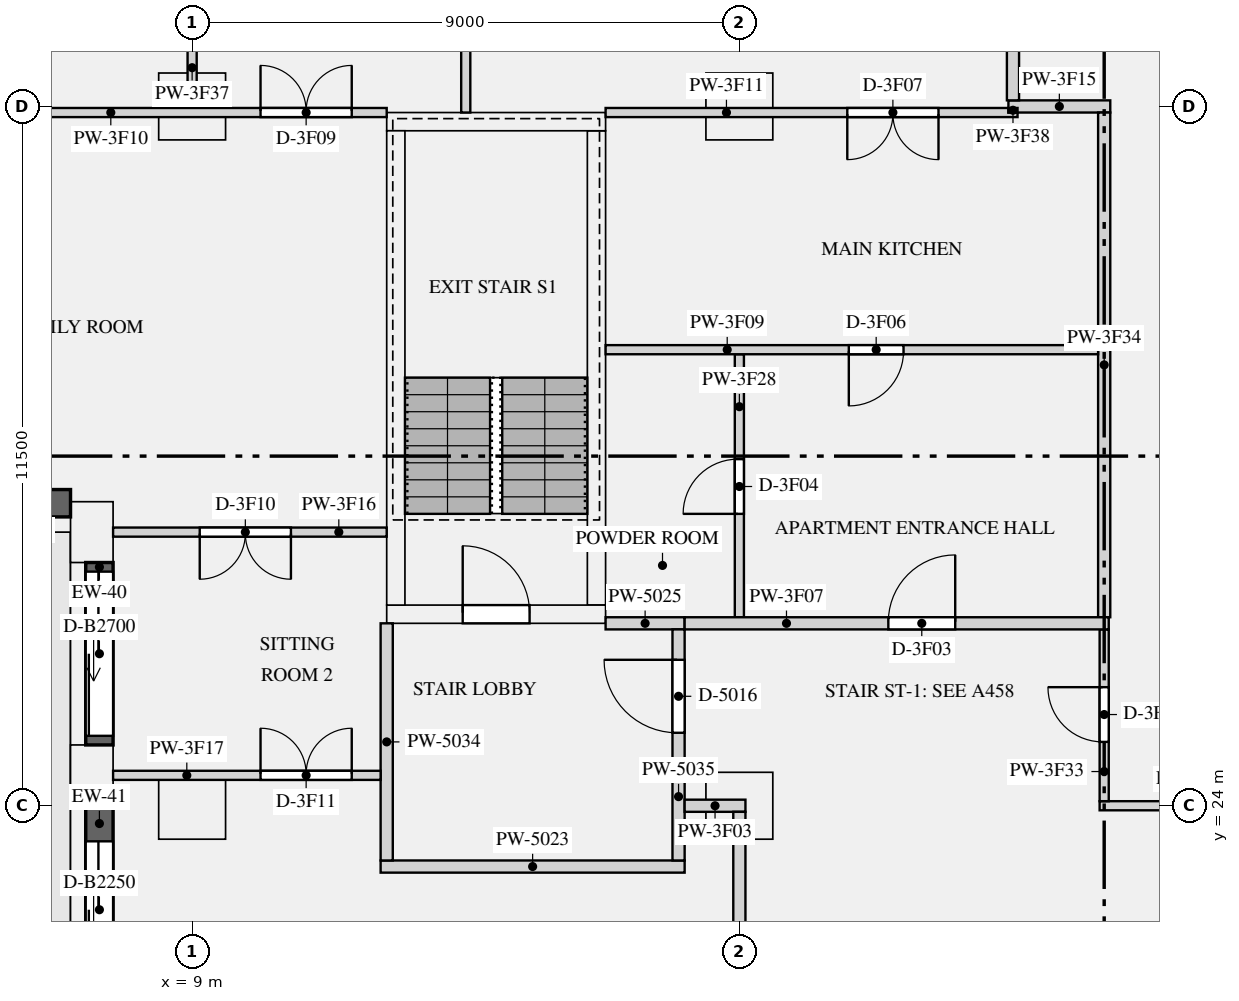
"""IFC4 building model, lengths in metres.
Left out: names, types, materials, properties, quantities, classifications, styles, units other than length and angle.
Written with IfcOpenShell. Run it as: python <this file> out.ifc"""

import sys

from ifc_helpers import new_model, si_unit, direction, frame, frame_2d, origin, origin_2d, place, context, subcontext, project, spatial, rectangle, extrude, element, fill, save


model = new_model("IFC4")
c1 = context("Model", 3, precision=1e-05, world=origin(), true_north=direction((0.0, 1.0)))
c2 = subcontext(c1, "Body", "Model", "MODEL_VIEW")
j1 = project(units=[si_unit("LENGTHUNIT", "METRE"), si_unit("PLANEANGLEUNIT", "RADIAN")], contexts=[c1])
p1 = place(None, origin())
s1 = spatial("IfcSite", under=j1, at=p1, CompositionType="ELEMENT")
p2 = place(p1, origin())
s2 = spatial("IfcBuilding", under=s1, at=p2, CompositionType="ELEMENT")
p3 = place(p2, frame((0.0, 0.0, 179.1)))
s3 = spatial("IfcBuildingStorey", under=s2, at=p3, CompositionType="ELEMENT", Elevation=179.1)
for number, where, z_axis, x_axis in (
    (1, (7.35, 28.5, 0.0), (0.0, 0.0, 1.0), (0.0, -1.0, 0.0)),
    (2, (7.35, 24.5, 0.0), (0.0, 0.0, 1.0), (0.0, -1.0, 0.0)),
):
    element("IfcColumn", number, at=place(p3, frame(where, z_axis=z_axis, x_axis=x_axis)), inside=s3, PredefinedType="USERDEFINED", context=c2, shape_type="SweptSolid", body=[
        extrude(rectangle(XDim=1.0, YDim=0.7, at=origin_2d()), origin(), (0.0, 0.0, 1.0), 3.15),
    ])
for number, where, z_axis, x_axis in (
    (3, (9.0, 24.0, 0.0), (0.0, 0.0, 1.0), (1.0, 0.0, 0.0)),
    (4, (18.0, 24.0, 0.0), (0.0, 0.0, 1.0), (1.0, 0.0, 0.0)),
    (5, (9.0, 35.5, 0.0), (0.0, 0.0, 1.0), (1.0, 0.0, 0.0)),
    (6, (18.0, 35.5, 0.0), (0.0, 0.0, 1.0), (1.0, 0.0, 0.0)),
):
    element("IfcColumn", number, at=place(p3, frame(where, z_axis=z_axis, x_axis=x_axis)), inside=s3, PredefinedType="COLUMN", context=c2, shape_type="SweptSolid", body=[
        extrude(rectangle(XDim=1.1, YDim=1.1, at=origin_2d()), origin(), (0.0, 0.0, 1.0), 3.15),
    ])
p4 = place(p3, frame((12.2, 27.15, 0.0), z_axis=(0.0, 0.0, 1.0), x_axis=(1.0, 0.0, 0.0)))
e7 = element("IfcWall", 7, at=p4, inside=s3, PredefinedType="SHEAR", context=c2, shape_type="SweptSolid", body=[
    extrude(rectangle(XDim=3.6, YDim=0.3, at=frame_2d((1.8, 0.0))), origin(), (0.0, 0.0, 1.0), 3.15),
])
p5 = place(p4, frame((1.25, 0.0, 0.0)))
e8 = element("IfcOpeningElement", 8, at=p5, cuts=e7, PredefinedType="OPENING", context=c2, shape_type="SweptSolid", body=[
    extrude(rectangle(XDim=1.1, YDim=2.1, at=frame_2d((0.55, 1.05))), frame((0.0, 0.16, 0.0), z_axis=(0.0, -1.0, 0.0), x_axis=(1.0, 0.0, 0.0)), (0.0, 0.0, 1.0), 0.32),
])
p6 = place(p3, frame((12.2, 35.25, 0.0), z_axis=(0.0, 0.0, 1.0), x_axis=(1.0, 0.0, 0.0)))
e9 = element("IfcWall", 9, at=p6, inside=s3, PredefinedType="SHEAR", context=c2, shape_type="SweptSolid", body=[
    extrude(rectangle(XDim=3.6, YDim=0.3, at=frame_2d((1.8, 0.0))), origin(), (0.0, 0.0, 1.0), 3.15),
])
for number, where, z_axis, x_axis in (
    (10, (12.35, 27.3, 0.0), (0.0, 0.0, 1.0), (0.0, 1.0, 0.0)),
    (11, (15.65, 27.3, 0.0), (0.0, 0.0, 1.0), (0.0, 1.0, 0.0)),
):
    element("IfcWall", number, at=place(p3, frame(where, z_axis=z_axis, x_axis=x_axis)), inside=s3, PredefinedType="SHEAR", context=c2, shape_type="SweptSolid", body=[
        extrude(rectangle(XDim=7.8, YDim=0.3, at=frame_2d((3.9, 0.0))), origin(), (0.0, 0.0, 1.0), 3.15),
    ])
p7 = place(p3, frame((5.5, 28.975, 0.9), z_axis=(0.0, 0.0, 1.0), x_axis=(1.0, 0.0, 0.0)))
e12 = element("IfcWall", 12, at=p7, inside=s3, PredefinedType="SOLIDWALL", context=c2, shape_type="SweptSolid", body=[
    extrude(rectangle(XDim=1.5, YDim=0.45, at=frame_2d((0.75, 0.0))), origin(), (0.0, 0.0, 1.0), 1.93),
])
p8 = place(p3, frame((7.475, 28.0, 0.0), z_axis=(0.0, 0.0, 1.0), x_axis=(0.0, -1.0, 0.0)))
e13 = element("IfcWall", 13, at=p8, inside=s3, PredefinedType="SOLIDWALL", context=c2, shape_type="SweptSolid", body=[
    extrude(rectangle(XDim=3.0, YDim=0.45, at=frame_2d((1.5, 0.0))), origin(), (0.0, 0.0, 1.0), 2.83),
])
p9 = place(p8, frame((0.15, 0.0, 0.0)))
e14 = element("IfcOpeningElement", 14, at=p9, cuts=e13, PredefinedType="OPENING", context=c2, shape_type="SweptSolid", body=[
    extrude(rectangle(XDim=2.7, YDim=2.3, at=frame_2d((1.35, 1.15))), frame((0.0, 0.235, 0.0), z_axis=(0.0, -1.0, 0.0), x_axis=(1.0, 0.0, 0.0)), (0.0, 0.0, 1.0), 0.47),
])
p10 = place(p3, frame((7.475, 24.0, 0.0), z_axis=(0.0, 0.0, 1.0), x_axis=(0.0, -1.0, 0.0)))
e15 = element("IfcWall", 15, at=p10, inside=s3, PredefinedType="SOLIDWALL", context=c2, shape_type="SweptSolid", body=[
    extrude(rectangle(XDim=3.0, YDim=0.45, at=frame_2d((1.5, 0.0))), origin(), (0.0, 0.0, 1.0), 2.83),
])
p11 = place(p10, frame((0.585, 0.0, 0.0)))
e16 = element("IfcOpeningElement", 16, at=p11, cuts=e15, PredefinedType="OPENING", context=c2, shape_type="SweptSolid", body=[
    extrude(rectangle(XDim=2.25, YDim=2.3, at=frame_2d((1.125, 1.15))), frame((0.0, 0.235, 0.0), z_axis=(0.0, -1.0, 0.0), x_axis=(1.0, 0.0, 0.0)), (0.0, 0.0, 1.0), 0.47),
])
p12 = place(p3, frame((12.1, 23.0, 0.0), z_axis=(0.0, 0.0, 1.0), x_axis=(1.0, 0.0, 0.0)))
e17 = element("IfcWall", 17, at=p12, inside=s3, PredefinedType="PARTITIONING", context=c2, shape_type="SweptSolid", body=[
    extrude(rectangle(XDim=5.0, YDim=0.2, at=frame_2d((2.5, 0.0))), origin(), (0.0, 0.0, 1.0), 2.83),
])
p13 = place(p3, frame((15.8, 27.0, 0.0), z_axis=(0.0, 0.0, 1.0), x_axis=(1.0, 0.0, 0.0)))
e18 = element("IfcWall", 18, at=p13, inside=s3, PredefinedType="PARTITIONING", context=c2, shape_type="SweptSolid", body=[
    extrude(rectangle(XDim=1.3, YDim=0.2, at=frame_2d((0.65, 0.0))), origin(), (0.0, 0.0, 1.0), 2.83),
])
p14 = place(p3, frame((12.2, 23.1, 0.0), z_axis=(0.0, 0.0, 1.0), x_axis=(0.0, 1.0, 0.0)))
e19 = element("IfcWall", 19, at=p14, inside=s3, PredefinedType="PARTITIONING", context=c2, shape_type="SweptSolid", body=[
    extrude(rectangle(XDim=3.9, YDim=0.2, at=frame_2d((1.95, 0.0))), origin(), (0.0, 0.0, 1.0), 2.83),
])
p15 = place(p3, frame((17.0, 23.1, 0.0), z_axis=(0.0, 0.0, 1.0), x_axis=(0.0, 1.0, 0.0)))
e20 = element("IfcWall", 20, at=p15, inside=s3, PredefinedType="PARTITIONING", context=c2, shape_type="SweptSolid", body=[
    extrude(rectangle(XDim=3.8, YDim=0.2, at=frame_2d((1.9, 0.0))), origin(), (0.0, 0.0, 1.0), 2.83),
])
p16 = place(p15, frame((2.1, 0.0, 0.0)))
e21 = element("IfcOpeningElement", 21, at=p16, cuts=e20, PredefinedType="OPENING", context=c2, shape_type="SweptSolid", body=[
    extrude(rectangle(XDim=1.2, YDim=2.1, at=frame_2d((0.6, 1.05))), frame((0.0, 0.11, 0.0), z_axis=(0.0, -1.0, 0.0), x_axis=(1.0, 0.0, 0.0)), (0.0, 0.0, 1.0), 0.22),
])
p17 = place(p3, frame((23.925, 24.0, 0.0), z_axis=(0.0, 0.0, 1.0), x_axis=(1.0, 0.0, 0.0)))
e22 = element("IfcWall", 22, at=p17, inside=s3, PredefinedType="PARTITIONING", context=c2, shape_type="SweptSolid", body=[
    extrude(rectangle(XDim=3.075, YDim=0.15, at=frame_2d((1.538, 0.0))), origin(), (0.0, 0.0, 1.0), 2.83),
])
p18 = place(p3, frame((17.1, 24.0, 0.0), z_axis=(0.0, 0.0, 1.0), x_axis=(1.0, 0.0, 0.0)))
e23 = element("IfcWall", 23, at=p18, inside=s3, PredefinedType="PARTITIONING", context=c2, shape_type="SweptSolid", body=[
    extrude(rectangle(XDim=1.0, YDim=0.2, at=frame_2d((0.5, 0.0))), origin(), (0.0, 0.0, 1.0), 2.83),
])
p19 = place(p3, frame((17.1, 27.0, 0.0), z_axis=(0.0, 0.0, 1.0), x_axis=(1.0, 0.0, 0.0)))
e24 = element("IfcWall", 24, at=p19, inside=s3, PredefinedType="PARTITIONING", context=c2, shape_type="SweptSolid", body=[
    extrude(rectangle(XDim=6.975, YDim=0.2, at=frame_2d((3.487, 0.0))), origin(), (0.0, 0.0, 1.0), 2.83),
])
p20 = place(p19, frame((3.35, 0.0, 0.0)))
e25 = element("IfcOpeningElement", 25, at=p20, cuts=e24, PredefinedType="OPENING", context=c2, shape_type="SweptSolid", body=[
    extrude(rectangle(XDim=1.1, YDim=2.1, at=frame_2d((0.55, 1.05))), frame((0.0, 0.11, 0.0), z_axis=(0.0, -1.0, 0.0), x_axis=(1.0, 0.0, 0.0)), (0.0, 0.0, 1.0), 0.22),
])
p21 = place(p3, frame((15.8, 31.5, 0.0), z_axis=(0.0, 0.0, 1.0), x_axis=(1.0, 0.0, 0.0)))
e26 = element("IfcWall", 26, at=p21, inside=s3, PredefinedType="PARTITIONING", context=c2, shape_type="SweptSolid", body=[
    extrude(rectangle(XDim=8.1, YDim=0.15, at=frame_2d((4.05, 0.0))), origin(), (0.0, 0.0, 1.0), 2.83),
])
p22 = place(p21, frame((4.0, 0.0, 0.0)))
e27 = element("IfcOpeningElement", 27, at=p22, cuts=e26, PredefinedType="OPENING", context=c2, shape_type="SweptSolid", body=[
    extrude(rectangle(XDim=0.9, YDim=2.1, at=frame_2d((0.45, 1.05))), frame((0.0, 0.085, 0.0), z_axis=(0.0, -1.0, 0.0), x_axis=(1.0, 0.0, 0.0)), (0.0, 0.0, 1.0), 0.17),
])
p23 = place(p3, frame((5.2, 35.4, 0.0), z_axis=(0.0, 0.0, 1.0), x_axis=(1.0, 0.0, 0.0)))
e28 = element("IfcWall", 28, at=p23, inside=s3, PredefinedType="PARTITIONING", context=c2, shape_type="SweptSolid", body=[
    extrude(rectangle(XDim=7.0, YDim=0.15, at=frame_2d((3.5, 0.0))), origin(), (0.0, 0.0, 1.0), 2.83),
])
p24 = place(p23, frame((4.925, 0.0, 0.0)))
e29 = element("IfcOpeningElement", 29, at=p24, cuts=e28, PredefinedType="OPENING", context=c2, shape_type="SweptSolid", body=[
    extrude(rectangle(XDim=1.5, YDim=2.1, at=frame_2d((0.75, 1.05))), frame((0.0, 0.085, 0.0), z_axis=(0.0, -1.0, 0.0), x_axis=(1.0, 0.0, 0.0)), (0.0, 0.0, 1.0), 0.17),
])
p25 = place(p3, frame((15.8, 35.4, 0.0), z_axis=(0.0, 0.0, 1.0), x_axis=(1.0, 0.0, 0.0)))
e30 = element("IfcWall", 30, at=p25, inside=s3, PredefinedType="PARTITIONING", context=c2, shape_type="SweptSolid", body=[
    extrude(rectangle(XDim=6.775, YDim=0.15, at=frame_2d((3.387, 0.0))), origin(), (0.0, 0.0, 1.0), 2.83),
])
p26 = place(p25, frame((3.975, 0.0, 0.0)))
e31 = element("IfcOpeningElement", 31, at=p26, cuts=e30, PredefinedType="OPENING", context=c2, shape_type="SweptSolid", body=[
    extrude(rectangle(XDim=1.5, YDim=2.1, at=frame_2d((0.75, 1.05))), frame((0.0, 0.085, 0.0), z_axis=(0.0, -1.0, 0.0), x_axis=(1.0, 0.0, 0.0)), (0.0, 0.0, 1.0), 0.17),
])
p27 = place(p3, frame((22.425, 35.5, 0.0), z_axis=(0.0, 0.0, 1.0), x_axis=(1.0, 0.0, 0.0)))
e32 = element("IfcWall", 32, at=p27, inside=s3, PredefinedType="PARTITIONING", context=c2, shape_type="SweptSolid", body=[
    extrude(rectangle(XDim=1.675, YDim=0.2, at=frame_2d((0.837, 0.0))), origin(), (0.0, 0.0, 1.0), 2.83),
])
p28 = place(p3, frame((7.7, 28.5, 0.0), z_axis=(0.0, 0.0, 1.0), x_axis=(1.0, 0.0, 0.0)))
e33 = element("IfcWall", 33, at=p28, inside=s3, PredefinedType="PARTITIONING", context=c2, shape_type="SweptSolid", body=[
    extrude(rectangle(XDim=4.5, YDim=0.15, at=frame_2d((2.25, 0.0))), origin(), (0.0, 0.0, 1.0), 2.83),
])
p29 = place(p28, frame((1.425, 0.0, 0.0)))
e34 = element("IfcOpeningElement", 34, at=p29, cuts=e33, PredefinedType="OPENING", context=c2, shape_type="SweptSolid", body=[
    extrude(rectangle(XDim=1.5, YDim=2.1, at=frame_2d((0.75, 1.05))), frame((0.0, 0.085, 0.0), z_axis=(0.0, -1.0, 0.0), x_axis=(1.0, 0.0, 0.0)), (0.0, 0.0, 1.0), 0.17),
])
p30 = place(p3, frame((7.7, 24.5, 0.0), z_axis=(0.0, 0.0, 1.0), x_axis=(1.0, 0.0, 0.0)))
e35 = element("IfcWall", 35, at=p30, inside=s3, PredefinedType="PARTITIONING", context=c2, shape_type="SweptSolid", body=[
    extrude(rectangle(XDim=4.4, YDim=0.15, at=frame_2d((2.2, 0.0))), origin(), (0.0, 0.0, 1.0), 2.83),
])
p31 = place(p30, frame((2.425, 0.0, 0.0)))
e36 = element("IfcOpeningElement", 36, at=p31, cuts=e35, PredefinedType="OPENING", context=c2, shape_type="SweptSolid", body=[
    extrude(rectangle(XDim=1.5, YDim=2.1, at=frame_2d((0.75, 1.05))), frame((0.0, 0.085, 0.0), z_axis=(0.0, -1.0, 0.0), x_axis=(1.0, 0.0, 0.0)), (0.0, 0.0, 1.0), 0.17),
])
p32 = place(p3, frame((18.0, 27.1, 0.0), z_axis=(0.0, 0.0, 1.0), x_axis=(0.0, 1.0, 0.0)))
e37 = element("IfcWall", 37, at=p32, inside=s3, PredefinedType="PARTITIONING", context=c2, shape_type="SweptSolid", body=[
    extrude(rectangle(XDim=4.325, YDim=0.15, at=frame_2d((2.163, 0.0))), origin(), (0.0, 0.0, 1.0), 2.83),
])
p33 = place(p32, frame((1.7, 0.0, 0.0)))
e38 = element("IfcOpeningElement", 38, at=p33, cuts=e37, PredefinedType="OPENING", context=c2, shape_type="SweptSolid", body=[
    extrude(rectangle(XDim=0.9, YDim=2.1, at=frame_2d((0.45, 1.05))), frame((0.0, 0.085, 0.0), z_axis=(0.0, -1.0, 0.0), x_axis=(1.0, 0.0, 0.0)), (0.0, 0.0, 1.0), 0.17),
])
p34 = place(p3, frame((18.0, 16.1, 0.0), z_axis=(0.0, 0.0, 1.0), x_axis=(0.0, 1.0, 0.0)))
e39 = element("IfcWall", 39, at=p34, inside=s3, PredefinedType="PARTITIONING", context=c2, shape_type="SweptSolid", body=[
    extrude(rectangle(XDim=7.8, YDim=0.2, at=frame_2d((3.9, 0.0))), origin(), (0.0, 0.0, 1.0), 2.83),
])
p35 = place(p3, frame((24.0, 24.075, 0.0), z_axis=(0.0, 0.0, 1.0), x_axis=(0.0, 1.0, 0.0)))
e40 = element("IfcWall", 40, at=p35, inside=s3, PredefinedType="PARTITIONING", context=c2, shape_type="SweptSolid", body=[
    extrude(rectangle(XDim=2.825, YDim=0.15, at=frame_2d((1.413, 0.0))), origin(), (0.0, 0.0, 1.0), 2.83),
])
p36 = place(p35, frame((0.975, 0.0, 0.0)))
e41 = element("IfcOpeningElement", 41, at=p36, cuts=e40, PredefinedType="OPENING", context=c2, shape_type="SweptSolid", body=[
    extrude(rectangle(XDim=0.9, YDim=2.1, at=frame_2d((0.45, 1.05))), frame((0.0, 0.085, 0.0), z_axis=(0.0, -1.0, 0.0), x_axis=(1.0, 0.0, 0.0)), (0.0, 0.0, 1.0), 0.17),
])
p37 = place(p3, frame((24.0, 27.1, 0.0), z_axis=(0.0, 0.0, 1.0), x_axis=(0.0, 1.0, 0.0)))
e42 = element("IfcWall", 42, at=p37, inside=s3, PredefinedType="PARTITIONING", context=c2, shape_type="SweptSolid", body=[
    extrude(rectangle(XDim=8.3, YDim=0.2, at=frame_2d((4.15, 0.0))), origin(), (0.0, 0.0, 1.0), 2.83),
])
p38 = place(p3, frame((9.0, 35.475, 0.0), z_axis=(0.0, 0.0, 1.0), x_axis=(0.0, 1.0, 0.0)))
e43 = element("IfcWall", 43, at=p38, inside=s3, PredefinedType="PARTITIONING", context=c2, shape_type="SweptSolid", body=[
    extrude(rectangle(XDim=2.825, YDim=0.15, at=frame_2d((1.413, 0.0))), origin(), (0.0, 0.0, 1.0), 2.83),
])
p39 = place(p38, frame((1.325, 0.0, 0.0)))
e44 = element("IfcOpeningElement", 44, at=p39, cuts=e43, PredefinedType="OPENING", context=c2, shape_type="SweptSolid", body=[
    extrude(rectangle(XDim=0.9, YDim=2.1, at=frame_2d((0.45, 1.05))), frame((0.0, 0.085, 0.0), z_axis=(0.0, -1.0, 0.0), x_axis=(1.0, 0.0, 0.0)), (0.0, 0.0, 1.0), 0.17),
])
p40 = place(p3, frame((22.5, 35.4, 0.0), z_axis=(0.0, 0.0, 1.0), x_axis=(0.0, 1.0, 0.0)))
e45 = element("IfcWall", 45, at=p40, inside=s3, PredefinedType="PARTITIONING", context=c2, shape_type="SweptSolid", body=[
    extrude(rectangle(XDim=0.075, YDim=0.15, at=frame_2d((0.038, 0.0))), origin(), (0.0, 0.0, 1.0), 2.83),
])
p41 = place(p3, frame((22.5, 35.6, 0.0), z_axis=(0.0, 0.0, 1.0), x_axis=(0.0, 1.0, 0.0)))
e46 = element("IfcWall", 46, at=p41, inside=s3, PredefinedType="PARTITIONING", context=c2, shape_type="SweptSolid", body=[
    extrude(rectangle(XDim=7.2, YDim=0.2, at=frame_2d((3.6, 0.0))), origin(), (0.0, 0.0, 1.0), 2.83),
])
p42 = place(p3, frame((13.5, 35.4, 0.0), z_axis=(0.0, 0.0, 1.0), x_axis=(0.0, 1.0, 0.0)))
e47 = element("IfcWall", 47, at=p42, inside=s3, PredefinedType="PARTITIONING", context=c2, shape_type="SweptSolid", body=[
    extrude(rectangle(XDim=7.4, YDim=0.15, at=frame_2d((3.7, 0.0))), origin(), (0.0, 0.0, 1.0), 2.83),
])
p43 = place(p42, frame((3.025, 0.0, 0.0)))
e48 = element("IfcOpeningElement", 48, at=p43, cuts=e47, PredefinedType="OPENING", context=c2, shape_type="SweptSolid", body=[
    extrude(rectangle(XDim=1.5, YDim=2.1, at=frame_2d((0.75, 1.05))), frame((0.0, 0.085, 0.0), z_axis=(0.0, -1.0, 0.0), x_axis=(1.0, 0.0, 0.0)), (0.0, 0.0, 1.0), 0.17),
])
p44 = place(p9, origin())
e49 = element("IfcDoor", 49, at=p44, inside=s3, OperationType="SLIDING_TO_LEFT", PredefinedType="DOOR", context=c2, shape_type="SweptSolid", body=[
    extrude(rectangle(XDim=2.7, YDim=2.3, at=frame_2d((1.35, 1.15))), frame((0.0, -0.07, 0.0), z_axis=(0.0, -1.0, 0.0), x_axis=(1.0, 0.0, 0.0)), (0.0, 0.0, 1.0), 0.05),
])
fill(e14, e49)
p45 = place(p11, origin())
e50 = element("IfcDoor", 50, at=p45, inside=s3, OperationType="SLIDING_TO_LEFT", PredefinedType="DOOR", context=c2, shape_type="SweptSolid", body=[
    extrude(rectangle(XDim=2.25, YDim=2.3, at=frame_2d((1.125, 1.15))), frame((0.0, -0.07, 0.0), z_axis=(0.0, -1.0, 0.0), x_axis=(1.0, 0.0, 0.0)), (0.0, 0.0, 1.0), 0.05),
])
fill(e16, e50)
p46 = place(p5, origin())
e51 = element("IfcDoor", 51, at=p46, inside=s3, OperationType="SINGLE_SWING_LEFT", PredefinedType="DOOR", context=c2, shape_type="SweptSolid", body=[
    extrude(rectangle(XDim=1.1, YDim=2.1, at=frame_2d((0.55, 1.05))), frame((0.0, 0.025, 0.0), z_axis=(0.0, -1.0, 0.0), x_axis=(1.0, 0.0, 0.0)), (0.0, 0.0, 1.0), 0.05),
])
fill(e8, e51)
p47 = place(p16, origin())
e52 = element("IfcDoor", 52, at=p47, inside=s3, OperationType="SINGLE_SWING_RIGHT", PredefinedType="DOOR", context=c2, shape_type="SweptSolid", body=[
    extrude(rectangle(XDim=1.2, YDim=2.1, at=frame_2d((0.6, 1.05))), frame((0.0, 0.025, 0.0), z_axis=(0.0, -1.0, 0.0), x_axis=(1.0, 0.0, 0.0)), (0.0, 0.0, 1.0), 0.05),
])
fill(e21, e52)
p48 = place(p20, origin())
e53 = element("IfcDoor", 53, at=p48, inside=s3, OperationType="SINGLE_SWING_RIGHT", PredefinedType="DOOR", context=c2, shape_type="SweptSolid", body=[
    extrude(rectangle(XDim=1.1, YDim=2.1, at=frame_2d((0.55, 1.05))), frame((0.0, 0.025, 0.0), z_axis=(0.0, -1.0, 0.0), x_axis=(1.0, 0.0, 0.0)), (0.0, 0.0, 1.0), 0.05),
])
fill(e25, e53)
p49 = place(p33, origin())
e54 = element("IfcDoor", 54, at=p49, inside=s3, OperationType="SINGLE_SWING_LEFT", PredefinedType="DOOR", context=c2, shape_type="SweptSolid", body=[
    extrude(rectangle(XDim=0.9, YDim=2.1, at=frame_2d((0.45, 1.05))), frame((0.0, 0.025, 0.0), z_axis=(0.0, -1.0, 0.0), x_axis=(1.0, 0.0, 0.0)), (0.0, 0.0, 1.0), 0.05),
])
fill(e38, e54)
p50 = place(p22, frame((0.9, 0.0, 0.0), z_axis=(0.0, 0.0, 1.0), x_axis=(-1.0, 0.0, 0.0)))
e55 = element("IfcDoor", 55, at=p50, inside=s3, OperationType="SINGLE_SWING_RIGHT", PredefinedType="DOOR", context=c2, shape_type="SweptSolid", body=[
    extrude(rectangle(XDim=0.9, YDim=2.1, at=frame_2d((0.45, 1.05))), frame((0.0, 0.025, 0.0), z_axis=(0.0, -1.0, 0.0), x_axis=(1.0, 0.0, 0.0)), (0.0, 0.0, 1.0), 0.05),
])
fill(e27, e55)
p51 = place(p26, frame((1.5, 0.0, 0.0), z_axis=(0.0, 0.0, 1.0), x_axis=(-1.0, 0.0, 0.0)))
e56 = element("IfcDoor", 56, at=p51, inside=s3, OperationType="DOUBLE_DOOR_SINGLE_SWING", PredefinedType="DOOR", context=c2, shape_type="SweptSolid", body=[
    extrude(rectangle(XDim=1.5, YDim=2.1, at=frame_2d((0.75, 1.05))), frame((0.0, 0.025, 0.0), z_axis=(0.0, -1.0, 0.0), x_axis=(1.0, 0.0, 0.0)), (0.0, 0.0, 1.0), 0.05),
])
fill(e31, e56)
p52 = place(p24, origin())
e57 = element("IfcDoor", 57, at=p52, inside=s3, OperationType="DOUBLE_DOOR_SINGLE_SWING", PredefinedType="DOOR", context=c2, shape_type="SweptSolid", body=[
    extrude(rectangle(XDim=1.5, YDim=2.1, at=frame_2d((0.75, 1.05))), frame((0.0, 0.025, 0.0), z_axis=(0.0, -1.0, 0.0), x_axis=(1.0, 0.0, 0.0)), (0.0, 0.0, 1.0), 0.05),
])
fill(e29, e57)
p53 = place(p29, frame((1.5, 0.0, 0.0), z_axis=(0.0, 0.0, 1.0), x_axis=(-1.0, 0.0, 0.0)))
e58 = element("IfcDoor", 58, at=p53, inside=s3, OperationType="DOUBLE_DOOR_SINGLE_SWING", PredefinedType="DOOR", context=c2, shape_type="SweptSolid", body=[
    extrude(rectangle(XDim=1.5, YDim=2.1, at=frame_2d((0.75, 1.05))), frame((0.0, 0.025, 0.0), z_axis=(0.0, -1.0, 0.0), x_axis=(1.0, 0.0, 0.0)), (0.0, 0.0, 1.0), 0.05),
])
fill(e34, e58)
p54 = place(p31, origin())
e59 = element("IfcDoor", 59, at=p54, inside=s3, OperationType="DOUBLE_DOOR_SINGLE_SWING", PredefinedType="DOOR", context=c2, shape_type="SweptSolid", body=[
    extrude(rectangle(XDim=1.5, YDim=2.1, at=frame_2d((0.75, 1.05))), frame((0.0, 0.025, 0.0), z_axis=(0.0, -1.0, 0.0), x_axis=(1.0, 0.0, 0.0)), (0.0, 0.0, 1.0), 0.05),
])
fill(e36, e59)
p55 = place(p36, origin())
e60 = element("IfcDoor", 60, at=p55, inside=s3, OperationType="SINGLE_SWING_RIGHT", PredefinedType="DOOR", context=c2, shape_type="SweptSolid", body=[
    extrude(rectangle(XDim=0.9, YDim=2.1, at=frame_2d((0.45, 1.05))), frame((0.0, 0.025, 0.0), z_axis=(0.0, -1.0, 0.0), x_axis=(1.0, 0.0, 0.0)), (0.0, 0.0, 1.0), 0.05),
])
fill(e41, e60)
save(model, sys.argv[1])
